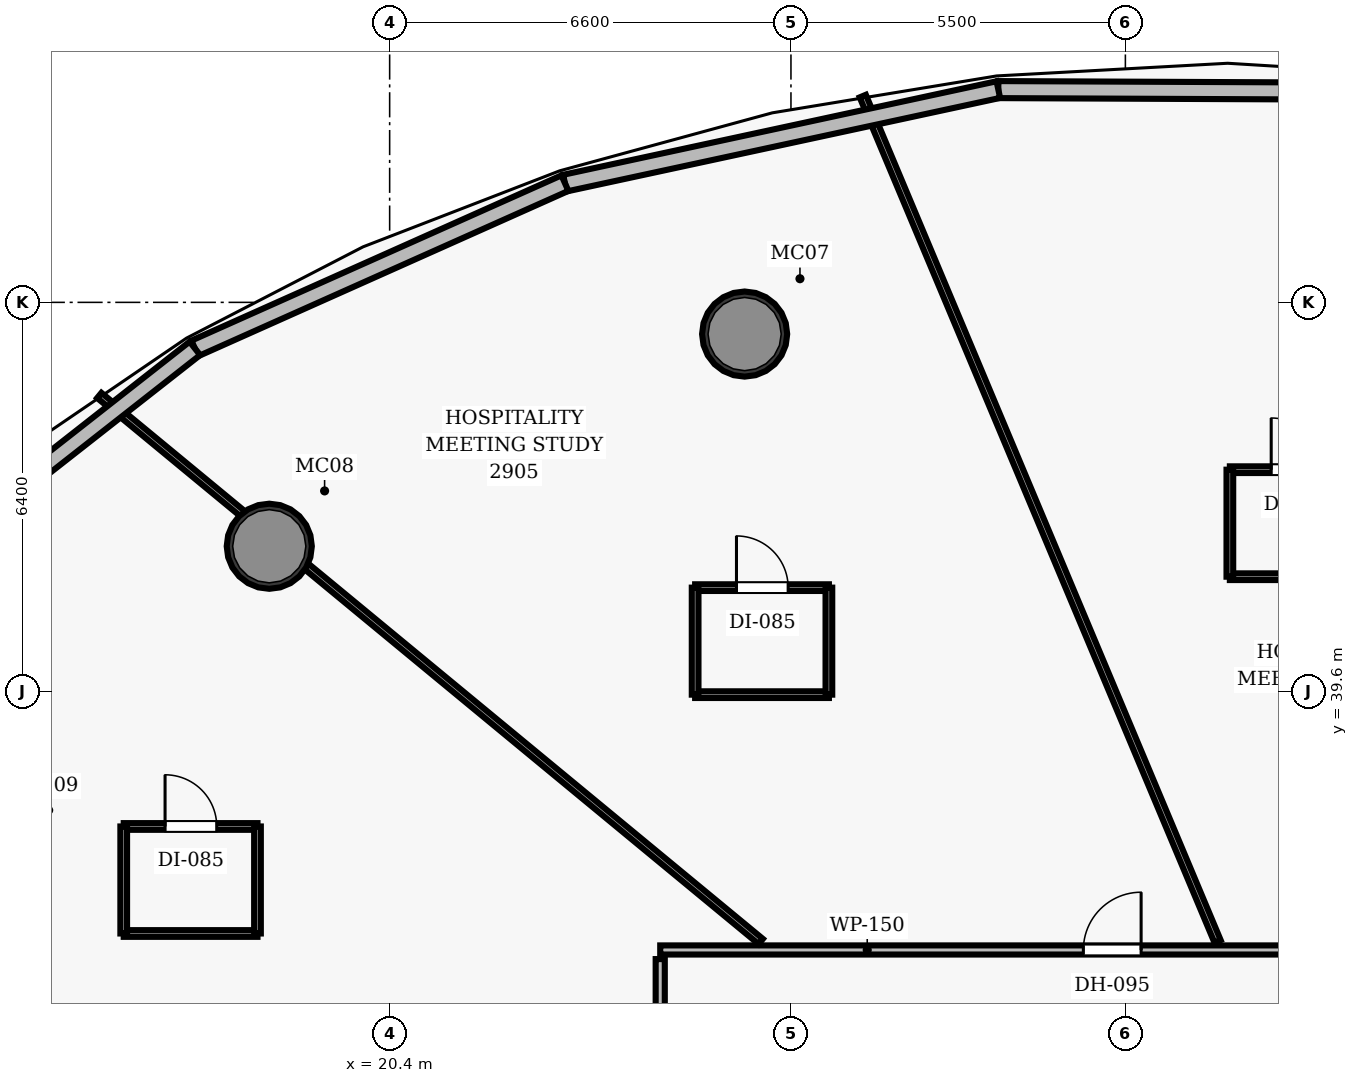
"""IFC4 building model, lengths in metres.
Left out: names, types, materials, properties, quantities, classifications, styles, units other than length and angle.
Written with IfcOpenShell. Run it as: python <this file> out.ifc"""

import sys

from ifc_helpers import new_model, si_unit, direction, frame, frame_2d, origin, origin_2d, place, context, subcontext, project, spatial, rectangle, hollow_circle, extrude, element, fill, save


model = new_model("IFC4")
c1 = context("Model", 3, precision=1e-05, world=origin(), true_north=direction((0.0, 1.0)))
c2 = subcontext(c1, "Body", "Model", "MODEL_VIEW")
j1 = project(units=[si_unit("LENGTHUNIT", "METRE"), si_unit("PLANEANGLEUNIT", "RADIAN")], contexts=[c1])
p1 = place(None, origin())
s1 = spatial("IfcSite", under=j1, at=p1, CompositionType="ELEMENT")
p2 = place(p1, origin())
s2 = spatial("IfcBuilding", under=s1, at=p2, CompositionType="ELEMENT")
p3 = place(p2, frame((0.0, 0.0, 120.3)))
s3 = spatial("IfcBuildingStorey", under=s2, at=p3, CompositionType="ELEMENT", Elevation=120.3)
for number, where, z_axis, x_axis in (
    (1, (26.238, 45.479, 0.0), (0.0, 0.0, 1.0), (1.0, 0.0, 0.0)),
    (2, (18.42, 41.989, 0.0), (0.0, 0.0, 1.0), (1.0, 0.0, 0.0)),
):
    element("IfcColumn", number, at=place(p3, frame(where, z_axis=z_axis, x_axis=x_axis)), inside=s3, PredefinedType="COLUMN", context=c2, shape_type="SweptSolid", body=[
        extrude(hollow_circle(Radius=0.7, WallThickness=0.055, at=origin_2d()), origin(), (0.0, 0.0, 1.0), 3.5),
    ])
p4 = place(p3, frame((24.85, 35.35, 0.0), z_axis=(0.0, 0.0, 1.0), x_axis=(1.0, 0.0, 0.0)))
e3 = element("IfcWall", 3, at=p4, inside=s3, PredefinedType="PARTITIONING", context=c2, shape_type="SweptSolid", body=[
    extrude(rectangle(XDim=26.0, YDim=0.15, at=frame_2d((13.0, 0.0))), origin(), (0.0, 0.0, 1.0), 2.675),
])
p5 = place(p4, frame((20.21, 0.0, 0.0)))
e4 = element("IfcOpeningElement", 4, at=p5, cuts=e3, PredefinedType="OPENING", context=c2, shape_type="SweptSolid", body=[
    extrude(rectangle(XDim=0.95, YDim=2.15, at=frame_2d((0.475, 1.075))), frame((0.0, 0.085, 0.0), z_axis=(0.0, -1.0, 0.0), x_axis=(1.0, 0.0, 0.0)), (0.0, 0.0, 1.0), 0.17),
])
p6 = place(p4, frame((14.655, 0.0, 0.0)))
e5 = element("IfcOpeningElement", 5, at=p6, cuts=e3, PredefinedType="OPENING", context=c2, shape_type="SweptSolid", body=[
    extrude(rectangle(XDim=0.95, YDim=2.15, at=frame_2d((0.475, 1.075))), frame((0.0, 0.085, 0.0), z_axis=(0.0, -1.0, 0.0), x_axis=(1.0, 0.0, 0.0)), (0.0, 0.0, 1.0), 0.17),
])
p7 = place(p4, frame((12.441, 0.0, 0.0)))
e6 = element("IfcOpeningElement", 6, at=p7, cuts=e3, PredefinedType="OPENING", context=c2, shape_type="SweptSolid", body=[
    extrude(rectangle(XDim=0.95, YDim=2.15, at=frame_2d((0.475, 1.075))), frame((0.0, 0.085, 0.0), z_axis=(0.0, -1.0, 0.0), x_axis=(1.0, 0.0, 0.0)), (0.0, 0.0, 1.0), 0.17),
])
p8 = place(p4, frame((6.959, 0.0, 0.0)))
e7 = element("IfcOpeningElement", 7, at=p8, cuts=e3, PredefinedType="OPENING", context=c2, shape_type="SweptSolid", body=[
    extrude(rectangle(XDim=0.95, YDim=2.15, at=frame_2d((0.475, 1.075))), frame((0.0, 0.085, 0.0), z_axis=(0.0, -1.0, 0.0), x_axis=(1.0, 0.0, 0.0)), (0.0, 0.0, 1.0), 0.17),
])
p9 = place(p3, frame((24.85, 27.08, 0.0), z_axis=(0.0, 0.0, 1.0), x_axis=(0.0, 1.0, 0.0)))
e8 = element("IfcWall", 8, at=p9, inside=s3, PredefinedType="PARTITIONING", context=c2, shape_type="SweptSolid", body=[
    extrude(rectangle(XDim=8.12, YDim=0.15, at=frame_2d((4.06, 0.0))), origin(), (0.0, 0.0, 1.0), 2.675),
])
p10 = place(p9, frame((4.288, 0.0, 0.0)))
e9 = element("IfcOpeningElement", 9, at=p10, cuts=e8, PredefinedType="OPENING", context=c2, shape_type="SweptSolid", body=[
    extrude(rectangle(XDim=0.95, YDim=2.15, at=frame_2d((0.475, 1.075))), frame((0.0, 0.085, 0.0), z_axis=(0.0, -1.0, 0.0), x_axis=(1.0, 0.0, 0.0)), (0.0, 0.0, 1.0), 0.17),
])
p11 = place(p3, frame((34.017, 35.49, 0.0), z_axis=(0.0, 0.0, 1.0), x_axis=(-0.387027387503, 0.922068219452, 0.0)))
e10 = element("IfcWall", 10, at=p11, inside=s3, PredefinedType="PARTITIONING", context=c2, shape_type="SweptSolid", body=[
    extrude(rectangle(XDim=15.078, YDim=0.11, at=frame_2d((7.539, 0.0))), origin(), (0.0, 0.0, 1.0), 2.675),
])
p12 = place(p3, frame((26.503, 35.49, 0.0), z_axis=(0.0, 0.0, 1.0), x_axis=(-0.771196320286, 0.636597388918, 0.0)))
e11 = element("IfcWall", 11, at=p12, inside=s3, PredefinedType="PARTITIONING", context=c2, shape_type="SweptSolid", body=[
    extrude(rectangle(XDim=14.106, YDim=0.11, at=frame_2d((7.053, 0.0))), origin(), (0.0, 0.0, 1.0), 2.675),
])
p13 = place(p3, frame((34.218, 41.488, 0.0), z_axis=(0.0, 0.0, 1.0), x_axis=(1.0, 0.0, 0.0)))
e12 = element("IfcWall", 12, at=p13, inside=s3, PredefinedType="PARTITIONING", context=c2, shape_type="SweptSolid", body=[
    extrude(rectangle(XDim=2.2, YDim=0.11, at=frame_2d((1.1, 0.0))), origin(), (0.0, 0.0, 1.0), 2.675),
])
p14 = place(p3, frame((34.218, 43.248, 0.0), z_axis=(0.0, 0.0, 1.0), x_axis=(1.0, 0.0, 0.0)))
e13 = element("IfcWall", 13, at=p14, inside=s3, PredefinedType="PARTITIONING", context=c2, shape_type="SweptSolid", body=[
    extrude(rectangle(XDim=2.2, YDim=0.11, at=frame_2d((1.1, 0.0))), origin(), (0.0, 0.0, 1.0), 2.675),
])
p15 = place(p14, frame((0.68, 0.0, 0.0)))
e14 = element("IfcOpeningElement", 14, at=p15, cuts=e13, PredefinedType="OPENING", context=c2, shape_type="SweptSolid", body=[
    extrude(rectangle(XDim=0.85, YDim=2.1, at=frame_2d((0.425, 1.05))), frame((0.0, 0.065, 0.0), z_axis=(0.0, -1.0, 0.0), x_axis=(1.0, 0.0, 0.0)), (0.0, 0.0, 1.0), 0.13),
])
p16 = place(p3, frame((34.218, 41.488, 0.0), z_axis=(0.0, 0.0, 1.0), x_axis=(0.0, 1.0, 0.0)))
e15 = element("IfcWall", 15, at=p16, inside=s3, PredefinedType="PARTITIONING", context=c2, shape_type="SweptSolid", body=[
    extrude(rectangle(XDim=1.76, YDim=0.11, at=frame_2d((0.88, 0.0))), origin(), (0.0, 0.0, 1.0), 2.675),
])
p17 = place(p3, frame((25.424, 39.549, 0.0), z_axis=(0.0, 0.0, 1.0), x_axis=(1.0, 0.0, 0.0)))
e16 = element("IfcWall", 16, at=p17, inside=s3, PredefinedType="PARTITIONING", context=c2, shape_type="SweptSolid", body=[
    extrude(rectangle(XDim=2.2, YDim=0.11, at=frame_2d((1.1, 0.0))), origin(), (0.0, 0.0, 1.0), 2.675),
])
p18 = place(p3, frame((25.424, 41.309, 0.0), z_axis=(0.0, 0.0, 1.0), x_axis=(1.0, 0.0, 0.0)))
e17 = element("IfcWall", 17, at=p18, inside=s3, PredefinedType="PARTITIONING", context=c2, shape_type="SweptSolid", body=[
    extrude(rectangle(XDim=2.2, YDim=0.11, at=frame_2d((1.1, 0.0))), origin(), (0.0, 0.0, 1.0), 2.675),
])
p19 = place(p18, frame((0.68, 0.0, 0.0)))
e18 = element("IfcOpeningElement", 18, at=p19, cuts=e17, PredefinedType="OPENING", context=c2, shape_type="SweptSolid", body=[
    extrude(rectangle(XDim=0.85, YDim=2.1, at=frame_2d((0.425, 1.05))), frame((0.0, 0.065, 0.0), z_axis=(0.0, -1.0, 0.0), x_axis=(1.0, 0.0, 0.0)), (0.0, 0.0, 1.0), 0.13),
])
for number, where, z_axis, x_axis in (
    (19, (25.424, 39.549, 0.0), (0.0, 0.0, 1.0), (0.0, 1.0, 0.0)),
    (20, (27.624, 39.549, 0.0), (0.0, 0.0, 1.0), (0.0, 1.0, 0.0)),
):
    element("IfcWall", number, at=place(p3, frame(where, z_axis=z_axis, x_axis=x_axis)), inside=s3, PredefinedType="PARTITIONING", context=c2, shape_type="SweptSolid", body=[
        extrude(rectangle(XDim=1.76, YDim=0.11, at=frame_2d((0.88, 0.0))), origin(), (0.0, 0.0, 1.0), 2.675),
    ])
p20 = place(p3, frame((16.026, 35.621, 0.0), z_axis=(0.0, 0.0, 1.0), x_axis=(1.0, 0.0, 0.0)))
e21 = element("IfcWall", 21, at=p20, inside=s3, PredefinedType="PARTITIONING", context=c2, shape_type="SweptSolid", body=[
    extrude(rectangle(XDim=2.2, YDim=0.11, at=frame_2d((1.1, 0.0))), origin(), (0.0, 0.0, 1.0), 2.675),
])
p21 = place(p3, frame((16.026, 37.381, 0.0), z_axis=(0.0, 0.0, 1.0), x_axis=(1.0, 0.0, 0.0)))
e22 = element("IfcWall", 22, at=p21, inside=s3, PredefinedType="PARTITIONING", context=c2, shape_type="SweptSolid", body=[
    extrude(rectangle(XDim=2.2, YDim=0.11, at=frame_2d((1.1, 0.0))), origin(), (0.0, 0.0, 1.0), 2.675),
])
p22 = place(p21, frame((0.68, 0.0, 0.0)))
e23 = element("IfcOpeningElement", 23, at=p22, cuts=e22, PredefinedType="OPENING", context=c2, shape_type="SweptSolid", body=[
    extrude(rectangle(XDim=0.85, YDim=2.1, at=frame_2d((0.425, 1.05))), frame((0.0, 0.065, 0.0), z_axis=(0.0, -1.0, 0.0), x_axis=(1.0, 0.0, 0.0)), (0.0, 0.0, 1.0), 0.13),
])
for number, where, z_axis, x_axis in (
    (24, (16.026, 35.621, 0.0), (0.0, 0.0, 1.0), (0.0, 1.0, 0.0)),
    (25, (18.226, 35.621, 0.0), (0.0, 0.0, 1.0), (0.0, 1.0, 0.0)),
):
    element("IfcWall", number, at=place(p3, frame(where, z_axis=z_axis, x_axis=x_axis)), inside=s3, PredefinedType="PARTITIONING", context=c2, shape_type="SweptSolid", body=[
        extrude(rectangle(XDim=1.76, YDim=0.11, at=frame_2d((0.88, 0.0))), origin(), (0.0, 0.0, 1.0), 2.675),
    ])
p23 = place(p3, frame((30.41, 49.499, 0.0), z_axis=(0.0, 0.0, 1.0), x_axis=(0.99999051966, -0.004354376033, 0.0)))
e26 = element("IfcWall", 26, at=p23, inside=s3, PredefinedType="SOLIDWALL", context=c2, shape_type="SweptSolid", body=[
    extrude(rectangle(XDim=7.569, YDim=0.28, at=frame_2d((3.785, 0.0))), origin(), (0.0, 0.0, 1.0), 3.26),
])
p24 = place(p3, frame((23.283, 47.961, 0.0), z_axis=(0.0, 0.0, 1.0), x_axis=(0.977506970117, 0.21090311371, 0.0)))
e27 = element("IfcWall", 27, at=p24, inside=s3, PredefinedType="SOLIDWALL", context=c2, shape_type="SweptSolid", body=[
    extrude(rectangle(XDim=7.292, YDim=0.28, at=frame_2d((3.646, 0.0))), origin(), (0.0, 0.0, 1.0), 3.26),
])
p25 = place(p3, frame((17.197, 45.243, 0.0), z_axis=(0.0, 0.0, 1.0), x_axis=(0.913104765645, 0.407725013896, 0.0)))
e28 = element("IfcWall", 28, at=p25, inside=s3, PredefinedType="SOLIDWALL", context=c2, shape_type="SweptSolid", body=[
    extrude(rectangle(XDim=6.665, YDim=0.28, at=frame_2d((3.333, 0.0))), origin(), (0.0, 0.0, 1.0), 3.26),
])
p26 = place(p3, frame((12.615, 41.65, 0.0), z_axis=(0.0, 0.0, 1.0), x_axis=(0.786841839551, 0.617154696597, 0.0)))
e29 = element("IfcWall", 29, at=p26, inside=s3, PredefinedType="SOLIDWALL", context=c2, shape_type="SweptSolid", body=[
    extrude(rectangle(XDim=5.823, YDim=0.28, at=frame_2d((2.911, 0.0))), origin(), (0.0, 0.0, 1.0), 3.26),
])
p27 = place(p15, origin())
e30 = element("IfcDoor", 30, at=p27, inside=s3, OperationType="SINGLE_SWING_LEFT", PredefinedType="DOOR", context=c2, shape_type="SweptSolid", body=[
    extrude(rectangle(XDim=0.85, YDim=2.1, at=frame_2d((0.425, 1.05))), frame((0.0, 0.025, 0.0), z_axis=(0.0, -1.0, 0.0), x_axis=(1.0, 0.0, 0.0)), (0.0, 0.0, 1.0), 0.05),
])
fill(e14, e30)
p28 = place(p8, origin())
e31 = element("IfcDoor", 31, at=p28, inside=s3, OperationType="SINGLE_SWING_RIGHT", PredefinedType="DOOR", context=c2, shape_type="SweptSolid", body=[
    extrude(rectangle(XDim=0.95, YDim=2.15, at=frame_2d((0.475, 1.075))), frame((0.0, 0.025, 0.0), z_axis=(0.0, -1.0, 0.0), x_axis=(1.0, 0.0, 0.0)), (0.0, 0.0, 1.0), 0.05),
])
fill(e7, e31)
p29 = place(p19, origin())
e32 = element("IfcDoor", 32, at=p29, inside=s3, OperationType="SINGLE_SWING_LEFT", PredefinedType="DOOR", context=c2, shape_type="SweptSolid", body=[
    extrude(rectangle(XDim=0.85, YDim=2.1, at=frame_2d((0.425, 1.05))), frame((0.0, 0.025, 0.0), z_axis=(0.0, -1.0, 0.0), x_axis=(1.0, 0.0, 0.0)), (0.0, 0.0, 1.0), 0.05),
])
fill(e18, e32)
p30 = place(p22, origin())
e33 = element("IfcDoor", 33, at=p30, inside=s3, OperationType="SINGLE_SWING_LEFT", PredefinedType="DOOR", context=c2, shape_type="SweptSolid", body=[
    extrude(rectangle(XDim=0.85, YDim=2.1, at=frame_2d((0.425, 1.05))), frame((0.0, 0.025, 0.0), z_axis=(0.0, -1.0, 0.0), x_axis=(1.0, 0.0, 0.0)), (0.0, 0.0, 1.0), 0.05),
])
fill(e23, e33)
save(model, sys.argv[1])
